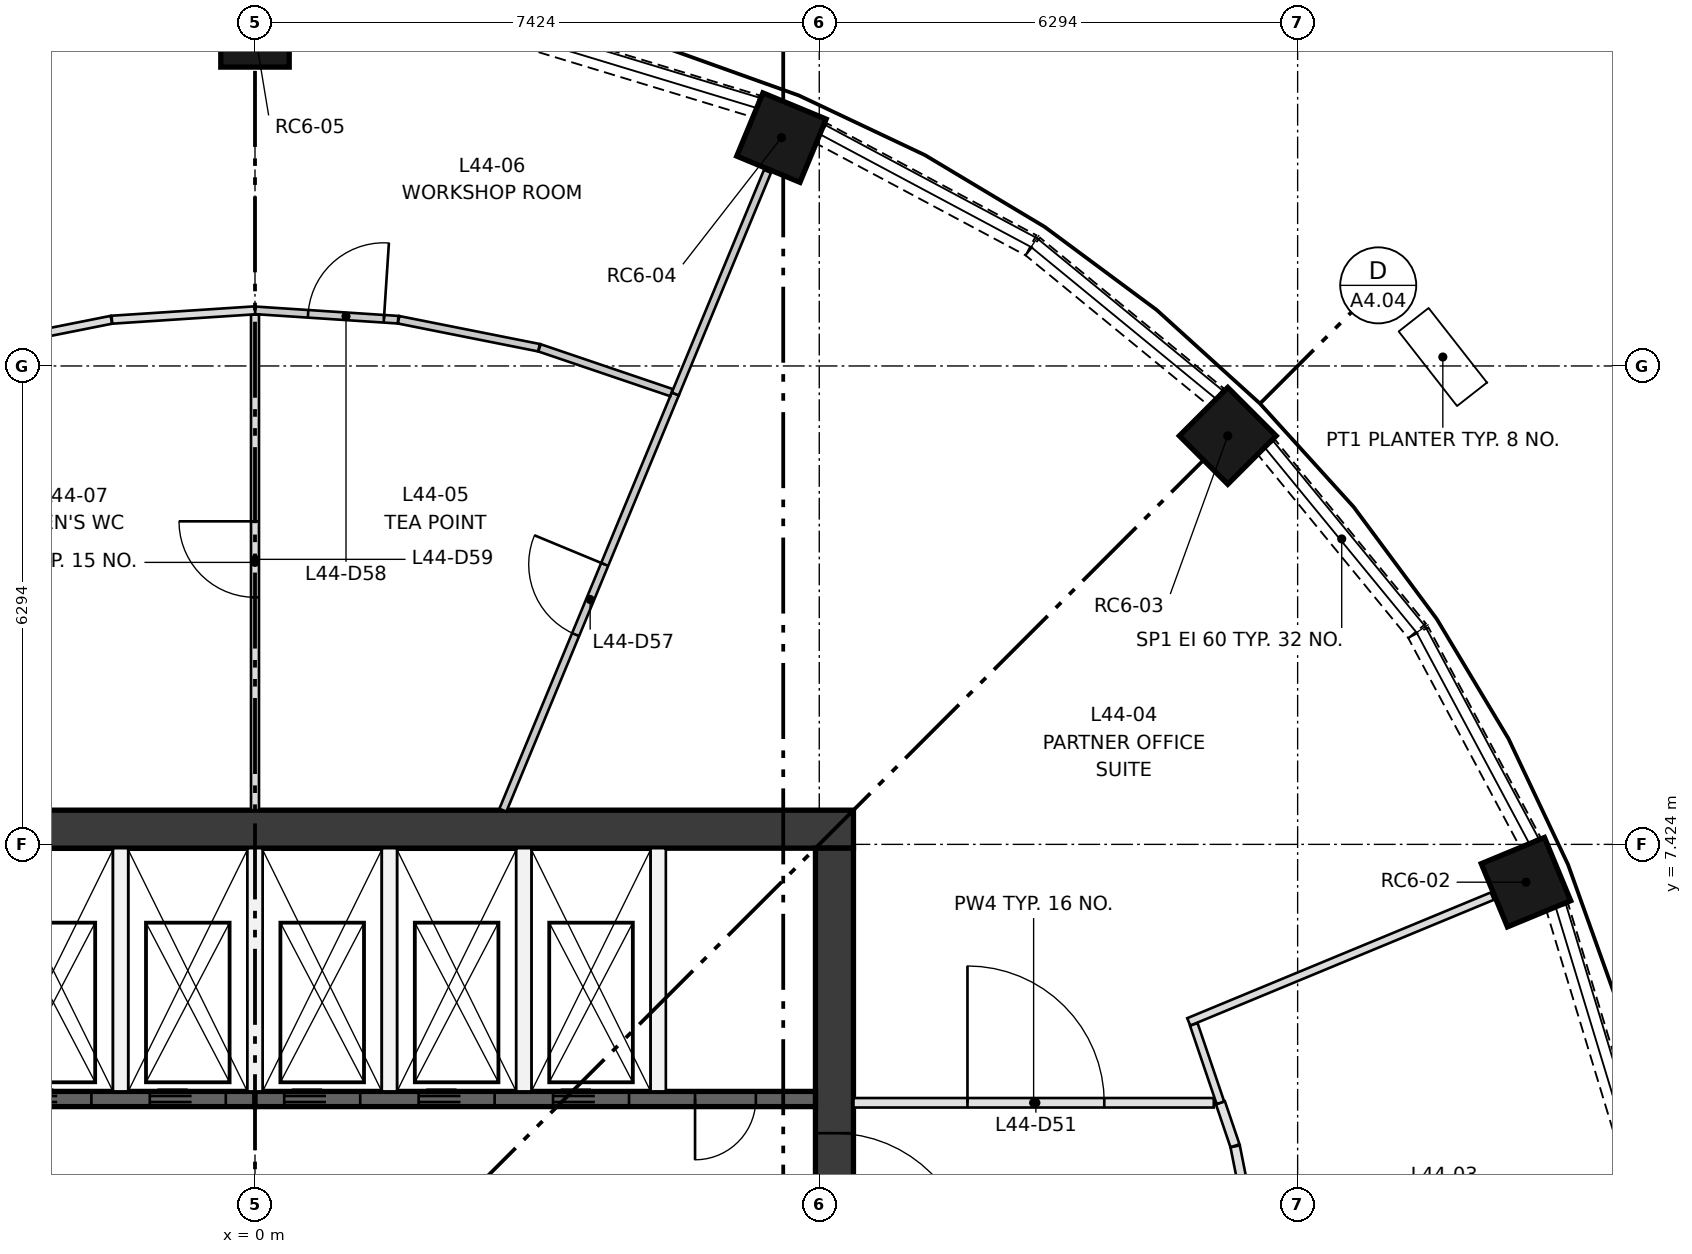
"""IFC4 building model, lengths in metres.
Left out: names, types, materials, properties, quantities, classifications, styles, units other than length and angle.
Written with IfcOpenShell. Run it as: python <this file> out.ifc"""

import sys

from ifc_helpers import new_model, si_unit, direction, frame, frame_2d, origin, origin_2d, place, context, subcontext, project, spatial, rectangle, extrude, element, fill, save


model = new_model("IFC4")
c1 = context("Model", 3, precision=1e-05, world=origin(), true_north=direction((0.0, 1.0)))
c2 = subcontext(c1, "Body", "Model", "MODEL_VIEW")
j1 = project(units=[si_unit("LENGTHUNIT", "METRE"), si_unit("PLANEANGLEUNIT", "RADIAN")], contexts=[c1])
p1 = place(None, origin())
s1 = spatial("IfcSite", under=j1, at=p1, CompositionType="ELEMENT")
p2 = place(p1, origin())
s2 = spatial("IfcBuilding", under=s1, at=p2, CompositionType="ELEMENT")
p3 = place(p2, frame((0.0, 0.0, 167.55)))
s3 = spatial("IfcBuildingStorey", under=s2, at=p3, CompositionType="ELEMENT", Elevation=167.55)
for number, where, z_axis, x_axis in (
    (1, (16.722, 6.927, 0.0), (0.0, 0.0, 1.0), (0.924, 0.383, 0.0)),
    (2, (12.799, 12.799, 0.0), (0.0, 0.0, 1.0), (0.707, 0.707, 0.0)),
    (3, (6.927, 16.722, 0.0), (0.0, 0.0, 1.0), (0.383, 0.924, 0.0)),
    (4, (0.0, 18.1, 0.0), (0.0, 0.0, 1.0), (0.0, 1.0, 0.0)),
):
    element("IfcColumn", number, at=place(p3, frame(where, z_axis=z_axis, x_axis=x_axis)), inside=s3, PredefinedType="COLUMN", context=c2, shape_type="SweptSolid", body=[
        extrude(rectangle(XDim=0.9, YDim=0.9, at=origin_2d()), origin(), (0.0, 0.0, 1.0), 3.35),
    ])
p4 = place(p3, frame((-7.874, 7.624, 0.0), z_axis=(0.0, 0.0, 1.0), x_axis=(1.0, 0.0, 0.0)))
e5 = element("IfcWall", 5, at=p4, inside=s3, PredefinedType="SHEAR", context=c2, shape_type="SweptSolid", body=[
    extrude(rectangle(XDim=15.748, YDim=0.5, at=frame_2d((7.874, 0.0))), origin(), (0.0, 0.0, 1.0), 3.35),
])
p5 = place(p3, frame((7.624, -7.374, 0.0), z_axis=(0.0, 0.0, 1.0), x_axis=(0.0, 1.0, 0.0)))
e6 = element("IfcWall", 6, at=p5, inside=s3, PredefinedType="SHEAR", context=c2, shape_type="SweptSolid", body=[
    extrude(rectangle(XDim=14.748, YDim=0.5, at=frame_2d((7.374, 0.0))), origin(), (0.0, 0.0, 1.0), 3.35),
])
p6 = place(p5, frame((6.874, 0.0, 0.0)))
e7 = element("IfcOpeningElement", 7, at=p6, cuts=e6, PredefinedType="OPENING", context=c2, shape_type="SweptSolid", body=[
    extrude(rectangle(XDim=1.0, YDim=2.1, at=frame_2d((0.5, 1.05))), frame((0.0, 0.26, 0.0), z_axis=(0.0, -1.0, 0.0), x_axis=(1.0, 0.0, 0.0)), (0.0, 0.0, 1.0), 0.52),
])
p7 = place(p5, frame((3.75, 0.0, 0.0)))
e8 = element("IfcOpeningElement", 8, at=p7, cuts=e6, PredefinedType="OPENING", context=c2, shape_type="SweptSolid", body=[
    extrude(rectangle(XDim=1.8, YDim=2.1, at=frame_2d((0.9, 1.05))), frame((0.0, 0.26, 0.0), z_axis=(0.0, -1.0, 0.0), x_axis=(1.0, 0.0, 0.0)), (0.0, 0.0, 1.0), 0.52),
])
p8 = place(p5, frame((9.198, 0.0, 0.0)))
e9 = element("IfcOpeningElement", 9, at=p8, cuts=e6, PredefinedType="OPENING", context=c2, shape_type="SweptSolid", body=[
    extrude(rectangle(XDim=1.8, YDim=2.1, at=frame_2d((0.9, 1.05))), frame((0.0, 0.26, 0.0), z_axis=(0.0, -1.0, 0.0), x_axis=(1.0, 0.0, 0.0)), (0.0, 0.0, 1.0), 0.52),
])
p9 = place(p3, frame((-7.374, 4.074, 0.0), z_axis=(0.0, 0.0, 1.0), x_axis=(1.0, 0.0, 0.0)))
e10 = element("IfcWall", 10, at=p9, inside=s3, PredefinedType="SHEAR", context=c2, shape_type="SweptSolid", body=[
    extrude(rectangle(XDim=7.374, YDim=0.2, at=frame_2d((3.687, 0.0))), origin(), (0.0, 0.0, 1.0), 3.0),
])
p10 = place(p9, frame((0.684, 0.0, 0.0)))
e11 = element("IfcOpeningElement", 11, at=p10, cuts=e10, PredefinedType="OPENING", context=c2, shape_type="SweptSolid", body=[
    extrude(rectangle(XDim=1.0, YDim=2.1, at=frame_2d((0.5, 1.05))), frame((0.0, 0.11, 0.0), z_axis=(0.0, -1.0, 0.0), x_axis=(1.0, 0.0, 0.0)), (0.0, 0.0, 1.0), 0.22),
])
p11 = place(p9, frame((2.453, 0.0, 0.0)))
e12 = element("IfcOpeningElement", 12, at=p11, cuts=e10, PredefinedType="OPENING", context=c2, shape_type="SweptSolid", body=[
    extrude(rectangle(XDim=1.0, YDim=2.1, at=frame_2d((0.5, 1.05))), frame((0.0, 0.11, 0.0), z_axis=(0.0, -1.0, 0.0), x_axis=(1.0, 0.0, 0.0)), (0.0, 0.0, 1.0), 0.22),
])
p12 = place(p9, frame((4.221, 0.0, 0.0)))
e13 = element("IfcOpeningElement", 13, at=p12, cuts=e10, PredefinedType="OPENING", context=c2, shape_type="SweptSolid", body=[
    extrude(rectangle(XDim=1.0, YDim=2.1, at=frame_2d((0.5, 1.05))), frame((0.0, 0.11, 0.0), z_axis=(0.0, -1.0, 0.0), x_axis=(1.0, 0.0, 0.0)), (0.0, 0.0, 1.0), 0.22),
])
p13 = place(p9, frame((5.99, 0.0, 0.0)))
e14 = element("IfcOpeningElement", 14, at=p13, cuts=e10, PredefinedType="OPENING", context=c2, shape_type="SweptSolid", body=[
    extrude(rectangle(XDim=1.0, YDim=2.1, at=frame_2d((0.5, 1.05))), frame((0.0, 0.11, 0.0), z_axis=(0.0, -1.0, 0.0), x_axis=(1.0, 0.0, 0.0)), (0.0, 0.0, 1.0), 0.22),
])
p14 = place(p3, frame((0.0, 4.074, 0.0), z_axis=(0.0, 0.0, 1.0), x_axis=(1.0, 0.0, 0.0)))
e15 = element("IfcWall", 15, at=p14, inside=s3, PredefinedType="SHEAR", context=c2, shape_type="SweptSolid", body=[
    extrude(rectangle(XDim=7.374, YDim=0.2, at=frame_2d((3.687, 0.0))), origin(), (0.0, 0.0, 1.0), 3.0),
])
p15 = place(p14, frame((0.384, 0.0, 0.0)))
e16 = element("IfcOpeningElement", 16, at=p15, cuts=e15, PredefinedType="OPENING", context=c2, shape_type="SweptSolid", body=[
    extrude(rectangle(XDim=1.0, YDim=2.1, at=frame_2d((0.5, 1.05))), frame((0.0, 0.11, 0.0), z_axis=(0.0, -1.0, 0.0), x_axis=(1.0, 0.0, 0.0)), (0.0, 0.0, 1.0), 0.22),
])
p16 = place(p14, frame((2.153, 0.0, 0.0)))
e17 = element("IfcOpeningElement", 17, at=p16, cuts=e15, PredefinedType="OPENING", context=c2, shape_type="SweptSolid", body=[
    extrude(rectangle(XDim=1.0, YDim=2.1, at=frame_2d((0.5, 1.05))), frame((0.0, 0.11, 0.0), z_axis=(0.0, -1.0, 0.0), x_axis=(1.0, 0.0, 0.0)), (0.0, 0.0, 1.0), 0.22),
])
p17 = place(p14, frame((3.921, 0.0, 0.0)))
e18 = element("IfcOpeningElement", 18, at=p17, cuts=e15, PredefinedType="OPENING", context=c2, shape_type="SweptSolid", body=[
    extrude(rectangle(XDim=1.0, YDim=2.1, at=frame_2d((0.5, 1.05))), frame((0.0, 0.11, 0.0), z_axis=(0.0, -1.0, 0.0), x_axis=(1.0, 0.0, 0.0)), (0.0, 0.0, 1.0), 0.22),
])
p18 = place(p14, frame((5.79, 0.0, 0.0)))
e19 = element("IfcOpeningElement", 19, at=p18, cuts=e15, PredefinedType="OPENING", context=c2, shape_type="SweptSolid", body=[
    extrude(rectangle(XDim=0.8, YDim=2.1, at=frame_2d((0.4, 1.05))), frame((0.0, 0.11, 0.0), z_axis=(0.0, -1.0, 0.0), x_axis=(1.0, 0.0, 0.0)), (0.0, 0.0, 1.0), 0.22),
])
for number, where, z_axis, x_axis in (
    (20, (-1.769, 4.174, 0.0), (0.0, 0.0, 1.0), (0.0, 1.0, 0.0)),
    (21, (0.0, 4.174, 0.0), (0.0, 0.0, 1.0), (0.0, 1.0, 0.0)),
    (22, (1.769, 4.174, 0.0), (0.0, 0.0, 1.0), (0.0, 1.0, 0.0)),
    (23, (3.537, 4.174, 0.0), (0.0, 0.0, 1.0), (0.0, 1.0, 0.0)),
    (24, (5.305, 4.174, 0.0), (0.0, 0.0, 1.0), (0.0, 1.0, 0.0)),
):
    element("IfcWall", number, at=place(p3, frame(where, z_axis=z_axis, x_axis=x_axis)), inside=s3, PredefinedType="PARTITIONING", context=c2, shape_type="SweptSolid", body=[
        extrude(rectangle(XDim=3.2, YDim=0.2, at=frame_2d((1.6, 0.0))), origin(), (0.0, 0.0, 1.0), 3.0),
    ])
p19 = place(p3, frame((18.042, 3.604, 0.0), z_axis=(0.0, 0.0, 1.0), x_axis=(-0.290083245834, 0.957001416136, 0.0)))
e25 = element("IfcWall", 25, at=p19, inside=s3, PredefinedType="SOLIDWALL", context=c2, shape_type="SweptSolid", body=[
    extrude(rectangle(XDim=3.127, YDim=0.3, at=frame_2d((1.563, 0.0))), origin(), (0.0, 0.0, 1.0), 0.9),
])
p20 = place(p3, frame((16.779, 7.452, 0.0), z_axis=(0.0, 0.0, 1.0), x_axis=(-0.47120441036, 0.882024038027, 0.0)))
e26 = element("IfcWall", 26, at=p20, inside=s3, PredefinedType="SOLIDWALL", context=c2, shape_type="SweptSolid", body=[
    extrude(rectangle(XDim=3.125, YDim=0.3, at=frame_2d((1.562, 0.0))), origin(), (0.0, 0.0, 1.0), 0.9),
])
for number, where, z_axis, x_axis in (
    (27, (15.29, 10.234, 0.0), (0.0, 0.0, 1.0), (-0.634, 0.773, 0.0)),
    (28, (12.651, 13.306, 0.0), (0.0, 0.0, 1.0), (-0.773, 0.634, 0.0)),
):
    element("IfcWall", number, at=place(p3, frame(where, z_axis=z_axis, x_axis=x_axis)), inside=s3, PredefinedType="SOLIDWALL", context=c2, shape_type="SweptSolid", body=[
        extrude(rectangle(XDim=3.127, YDim=0.3, at=frame_2d((1.563, 0.0))), origin(), (0.0, 0.0, 1.0), 0.9),
    ])
p21 = place(p3, frame((10.209, 15.306, 0.0), z_axis=(0.0, 0.0, 1.0), x_axis=(-0.882024038027, 0.47120441036, 0.0)))
e29 = element("IfcWall", 29, at=p21, inside=s3, PredefinedType="SOLIDWALL", context=c2, shape_type="SweptSolid", body=[
    extrude(rectangle(XDim=3.125, YDim=0.3, at=frame_2d((1.562, 0.0))), origin(), (0.0, 0.0, 1.0), 0.9),
])
p22 = place(p3, frame((6.596, 17.135, 0.0), z_axis=(0.0, 0.0, 1.0), x_axis=(-0.957001416136, 0.290083245834, 0.0)))
e30 = element("IfcWall", 30, at=p22, inside=s3, PredefinedType="SOLIDWALL", context=c2, shape_type="SweptSolid", body=[
    extrude(rectangle(XDim=3.127, YDim=0.3, at=frame_2d((1.563, 0.0))), origin(), (0.0, 0.0, 1.0), 0.9),
])
p23 = place(p3, frame((12.702, 4.024, 0.0), z_axis=(0.0, 0.0, 1.0), x_axis=(0.321374914787, -0.946952038989, 0.0)))
e31 = element("IfcWall", 31, at=p23, inside=s3, PredefinedType="PARTITIONING", context=c2, shape_type="SweptSolid", body=[
    extrude(rectangle(XDim=0.597, YDim=0.125, at=frame_2d((0.299, 0.0))), origin(), (0.0, 0.0, 1.0), 3.0),
])
p24 = place(p3, frame((12.896, 3.451, 0.0), z_axis=(0.0, 0.0, 1.0), x_axis=(0.195116516296, -0.980780069673, 0.0)))
e32 = element("IfcWall", 32, at=p24, inside=s3, PredefinedType="PARTITIONING", context=c2, shape_type="SweptSolid", body=[
    extrude(rectangle(XDim=1.738, YDim=0.125, at=frame_2d((0.869, 0.0))), origin(), (0.0, 0.0, 1.0), 3.0),
])
p25 = place(p3, frame((7.874, 4.024, 0.0), z_axis=(0.0, 0.0, 1.0), x_axis=(1.0, 0.0, 0.0)))
e33 = element("IfcWall", 33, at=p25, inside=s3, PredefinedType="PARTITIONING", context=c2, shape_type="SweptSolid", body=[
    extrude(rectangle(XDim=4.741, YDim=0.125, at=frame_2d((2.37, 0.0))), origin(), (0.0, 0.0, 1.0), 3.0),
])
p26 = place(p25, frame((1.5, 0.0, 0.0)))
e34 = element("IfcOpeningElement", 34, at=p26, cuts=e33, PredefinedType="OPENING", context=c2, shape_type="SweptSolid", body=[
    extrude(rectangle(XDim=1.8, YDim=2.1, at=frame_2d((0.9, 1.05))), frame((0.0, 0.073, 0.0), z_axis=(0.0, -1.0, 0.0), x_axis=(1.0, 0.0, 0.0)), (0.0, 0.0, 1.0), 0.145),
])
p27 = place(p3, frame((12.285, 5.089, 0.0), z_axis=(0.0, 0.0, 1.0), x_axis=(0.923865378524, 0.382717601325, 0.0)))
e35 = element("IfcWall", 35, at=p27, inside=s3, PredefinedType="PARTITIONING", context=c2, shape_type="SweptSolid", body=[
    extrude(rectangle(XDim=4.323, YDim=0.105, at=frame_2d((2.161, 0.0))), origin(), (0.0, 0.0, 1.0), 3.0),
])
p28 = place(p3, frame((12.702, 4.024, 0.0), z_axis=(0.0, 0.0, 1.0), x_axis=(-0.321468654442, 0.946920220616, 0.0)))
e36 = element("IfcWall", 36, at=p28, inside=s3, PredefinedType="PARTITIONING", context=c2, shape_type="SweptSolid", body=[
    extrude(rectangle(XDim=1.089, YDim=0.105, at=frame_2d((0.544, 0.0))), origin(), (0.0, 0.0, 1.0), 3.0),
])
p29 = place(p3, frame((3.261, 7.874, 0.0), z_axis=(0.0, 0.0, 1.0), x_axis=(0.382690105068, 0.923876768559, 0.0)))
e37 = element("IfcWall", 37, at=p29, inside=s3, PredefinedType="PARTITIONING", context=c2, shape_type="SweptSolid", body=[
    extrude(rectangle(XDim=5.927, YDim=0.1, at=frame_2d((2.964, 0.0))), origin(), (0.0, 0.0, 1.0), 3.0),
])
p30 = place(p29, frame((2.5, 0.0, 0.0)))
e38 = element("IfcOpeningElement", 38, at=p30, cuts=e37, PredefinedType="OPENING", context=c2, shape_type="SweptSolid", body=[
    extrude(rectangle(XDim=1.0, YDim=2.1, at=frame_2d((0.5, 1.05))), frame((0.0, 0.06, 0.0), z_axis=(0.0, -1.0, 0.0), x_axis=(1.0, 0.0, 0.0)), (0.0, 0.0, 1.0), 0.12),
])
p31 = place(p3, frame((5.53, 13.35, 0.0), z_axis=(0.0, 0.0, 1.0), x_axis=(0.382689618566, 0.923876970079, 0.0)))
e39 = element("IfcWall", 39, at=p31, inside=s3, PredefinedType="PARTITIONING", context=c2, shape_type="SweptSolid", body=[
    extrude(rectangle(XDim=3.17, YDim=0.1, at=frame_2d((1.585, 0.0))), origin(), (0.0, 0.0, 1.0), 3.0),
])
p32 = place(p3, frame((0.0, 14.45, 0.0), z_axis=(0.0, 0.0, 1.0), x_axis=(0.997862900294, -0.065342422802, 0.0)))
e40 = element("IfcWall", 40, at=p32, inside=s3, PredefinedType="PARTITIONING", context=c2, shape_type="SweptSolid", body=[
    extrude(rectangle(XDim=1.887, YDim=0.1, at=frame_2d((0.943, 0.0))), origin(), (0.0, 0.0, 1.0), 3.0),
])
p33 = place(p32, frame((0.7, 0.0, 0.0)))
e41 = element("IfcOpeningElement", 41, at=p33, cuts=e40, PredefinedType="OPENING", context=c2, shape_type="SweptSolid", body=[
    extrude(rectangle(XDim=1.0, YDim=2.1, at=frame_2d((0.5, 1.05))), frame((0.0, 0.06, 0.0), z_axis=(0.0, -1.0, 0.0), x_axis=(1.0, 0.0, 0.0)), (0.0, 0.0, 1.0), 0.12),
])
p34 = place(p3, frame((1.889, 14.326, 0.0), z_axis=(0.0, 0.0, 1.0), x_axis=(0.980789493394, -0.195069140684, 0.0)))
e42 = element("IfcWall", 42, at=p34, inside=s3, PredefinedType="PARTITIONING", context=c2, shape_type="SweptSolid", body=[
    extrude(rectangle(XDim=1.884, YDim=0.1, at=frame_2d((0.942, 0.0))), origin(), (0.0, 0.0, 1.0), 3.0),
])
p35 = place(p3, frame((3.743, 13.957, 0.0), z_axis=(0.0, 0.0, 1.0), x_axis=(0.946938181516, -0.321415743839, 0.0)))
e43 = element("IfcWall", 43, at=p35, inside=s3, PredefinedType="PARTITIONING", context=c2, shape_type="SweptSolid", body=[
    extrude(rectangle(XDim=1.834, YDim=0.1, at=frame_2d((0.917, 0.0))), origin(), (0.0, 0.0, 1.0), 3.0),
])
p36 = place(p3, frame((0.0, 7.874, 0.0), z_axis=(0.0, 0.0, 1.0), x_axis=(0.0, 1.0, 0.0)))
e44 = element("IfcWall", 44, at=p36, inside=s3, PredefinedType="PARTITIONING", context=c2, shape_type="SweptSolid", body=[
    extrude(rectangle(XDim=6.52, YDim=0.105, at=frame_2d((3.26, 0.0))), origin(), (0.0, 0.0, 1.0), 3.0),
])
p37 = place(p36, frame((2.8, 0.0, 0.0)))
e45 = element("IfcOpeningElement", 45, at=p37, cuts=e44, PredefinedType="OPENING", context=c2, shape_type="SweptSolid", body=[
    extrude(rectangle(XDim=1.0, YDim=2.1, at=frame_2d((0.5, 1.05))), frame((0.0, 0.062, 0.0), z_axis=(0.0, -1.0, 0.0), x_axis=(1.0, 0.0, 0.0)), (0.0, 0.0, 1.0), 0.125),
])
p38 = place(p3, frame((-1.889, 14.326, 0.0), z_axis=(0.0, 0.0, 1.0), x_axis=(-0.980784560384, -0.195093941763, 0.0)))
e46 = element("IfcWall", 46, at=p38, inside=s3, PredefinedType="PARTITIONING", context=c2, shape_type="SweptSolid", body=[
    extrude(rectangle(XDim=1.883, YDim=0.105, at=frame_2d((0.942, 0.0))), origin(), (0.0, 0.0, 1.0), 3.0),
])
p39 = place(p3, frame((0.0, 14.45, 0.0), z_axis=(0.0, 0.0, 1.0), x_axis=(-0.997862900294, -0.065342422802, 0.0)))
e47 = element("IfcWall", 47, at=p39, inside=s3, PredefinedType="PARTITIONING", context=c2, shape_type="SweptSolid", body=[
    extrude(rectangle(XDim=1.887, YDim=0.105, at=frame_2d((0.943, 0.0))), origin(), (0.0, 0.0, 1.0), 3.0),
])
p40 = place(p12, frame((1.0, 0.0, 0.0), z_axis=(0.0, 0.0, 1.0), x_axis=(-1.0, 0.0, 0.0)))
e48 = element("IfcDoor", 48, at=p40, inside=s3, OperationType="DOUBLE_DOOR_SLIDING", PredefinedType="DOOR", context=c2, shape_type="SweptSolid", body=[
    extrude(rectangle(XDim=1.0, YDim=2.1, at=frame_2d((0.5, 1.05))), frame((0.0, 0.025, 0.0), z_axis=(0.0, -1.0, 0.0), x_axis=(1.0, 0.0, 0.0)), (0.0, 0.0, 1.0), 0.05),
])
fill(e13, e48)
p41 = place(p13, frame((1.0, 0.0, 0.0), z_axis=(0.0, 0.0, 1.0), x_axis=(-1.0, 0.0, 0.0)))
e49 = element("IfcDoor", 49, at=p41, inside=s3, OperationType="DOUBLE_DOOR_SLIDING", PredefinedType="DOOR", context=c2, shape_type="SweptSolid", body=[
    extrude(rectangle(XDim=1.0, YDim=2.1, at=frame_2d((0.5, 1.05))), frame((0.0, 0.025, 0.0), z_axis=(0.0, -1.0, 0.0), x_axis=(1.0, 0.0, 0.0)), (0.0, 0.0, 1.0), 0.05),
])
fill(e14, e49)
p42 = place(p15, frame((1.0, 0.0, 0.0), z_axis=(0.0, 0.0, 1.0), x_axis=(-1.0, 0.0, 0.0)))
e50 = element("IfcDoor", 50, at=p42, inside=s3, OperationType="DOUBLE_DOOR_SLIDING", PredefinedType="DOOR", context=c2, shape_type="SweptSolid", body=[
    extrude(rectangle(XDim=1.0, YDim=2.1, at=frame_2d((0.5, 1.05))), frame((0.0, 0.025, 0.0), z_axis=(0.0, -1.0, 0.0), x_axis=(1.0, 0.0, 0.0)), (0.0, 0.0, 1.0), 0.05),
])
fill(e16, e50)
p43 = place(p16, frame((1.0, 0.0, 0.0), z_axis=(0.0, 0.0, 1.0), x_axis=(-1.0, 0.0, 0.0)))
e51 = element("IfcDoor", 51, at=p43, inside=s3, OperationType="DOUBLE_DOOR_SLIDING", PredefinedType="DOOR", context=c2, shape_type="SweptSolid", body=[
    extrude(rectangle(XDim=1.0, YDim=2.1, at=frame_2d((0.5, 1.05))), frame((0.0, 0.025, 0.0), z_axis=(0.0, -1.0, 0.0), x_axis=(1.0, 0.0, 0.0)), (0.0, 0.0, 1.0), 0.05),
])
fill(e17, e51)
p44 = place(p17, frame((1.0, 0.0, 0.0), z_axis=(0.0, 0.0, 1.0), x_axis=(-1.0, 0.0, 0.0)))
e52 = element("IfcDoor", 52, at=p44, inside=s3, OperationType="DOUBLE_DOOR_SLIDING", PredefinedType="DOOR", context=c2, shape_type="SweptSolid", body=[
    extrude(rectangle(XDim=1.0, YDim=2.1, at=frame_2d((0.5, 1.05))), frame((0.0, 0.025, 0.0), z_axis=(0.0, -1.0, 0.0), x_axis=(1.0, 0.0, 0.0)), (0.0, 0.0, 1.0), 0.05),
])
fill(e18, e52)
p45 = place(p18, frame((0.8, 0.0, 0.0), z_axis=(0.0, 0.0, 1.0), x_axis=(-1.0, 0.0, 0.0)))
e53 = element("IfcDoor", 53, at=p45, inside=s3, OperationType="SINGLE_SWING_LEFT", PredefinedType="DOOR", context=c2, shape_type="SweptSolid", body=[
    extrude(rectangle(XDim=0.8, YDim=2.1, at=frame_2d((0.4, 1.05))), frame((0.0, 0.025, 0.0), z_axis=(0.0, -1.0, 0.0), x_axis=(1.0, 0.0, 0.0)), (0.0, 0.0, 1.0), 0.05),
])
fill(e19, e53)
p46 = place(p8, frame((1.8, 0.0, 0.0), z_axis=(0.0, 0.0, 1.0), x_axis=(-1.0, 0.0, 0.0)))
e54 = element("IfcDoor", 54, at=p46, inside=s3, OperationType="DOUBLE_DOOR_SINGLE_SWING", PredefinedType="DOOR", context=c2, shape_type="SweptSolid", body=[
    extrude(rectangle(XDim=1.8, YDim=2.1, at=frame_2d((0.9, 1.05))), frame((0.0, 0.025, 0.0), z_axis=(0.0, -1.0, 0.0), x_axis=(1.0, 0.0, 0.0)), (0.0, 0.0, 1.0), 0.05),
])
fill(e9, e54)
p47 = place(p26, origin())
e55 = element("IfcDoor", 55, at=p47, inside=s3, OperationType="DOUBLE_DOOR_SINGLE_SWING", PredefinedType="DOOR", context=c2, shape_type="SweptSolid", body=[
    extrude(rectangle(XDim=1.8, YDim=2.1, at=frame_2d((0.9, 1.05))), frame((0.0, 0.025, 0.0), z_axis=(0.0, -1.0, 0.0), x_axis=(1.0, 0.0, 0.0)), (0.0, 0.0, 1.0), 0.05),
])
fill(e34, e55)
p48 = place(p30, origin())
e56 = element("IfcDoor", 56, at=p48, inside=s3, OperationType="SINGLE_SWING_RIGHT", PredefinedType="DOOR", context=c2, shape_type="SweptSolid", body=[
    extrude(rectangle(XDim=1.0, YDim=2.1, at=frame_2d((0.5, 1.05))), frame((0.0, 0.025, 0.0), z_axis=(0.0, -1.0, 0.0), x_axis=(1.0, 0.0, 0.0)), (0.0, 0.0, 1.0), 0.05),
])
fill(e38, e56)
p49 = place(p33, origin())
e57 = element("IfcDoor", 57, at=p49, inside=s3, OperationType="SINGLE_SWING_RIGHT", PredefinedType="DOOR", context=c2, shape_type="SweptSolid", body=[
    extrude(rectangle(XDim=1.0, YDim=2.1, at=frame_2d((0.5, 1.05))), frame((0.0, 0.025, 0.0), z_axis=(0.0, -1.0, 0.0), x_axis=(1.0, 0.0, 0.0)), (0.0, 0.0, 1.0), 0.05),
])
fill(e41, e57)
p50 = place(p37, origin())
e58 = element("IfcDoor", 58, at=p50, inside=s3, OperationType="SINGLE_SWING_RIGHT", PredefinedType="DOOR", context=c2, shape_type="SweptSolid", body=[
    extrude(rectangle(XDim=1.0, YDim=2.1, at=frame_2d((0.5, 1.05))), frame((0.0, 0.025, 0.0), z_axis=(0.0, -1.0, 0.0), x_axis=(1.0, 0.0, 0.0)), (0.0, 0.0, 1.0), 0.05),
])
fill(e45, e58)
save(model, sys.argv[1])
